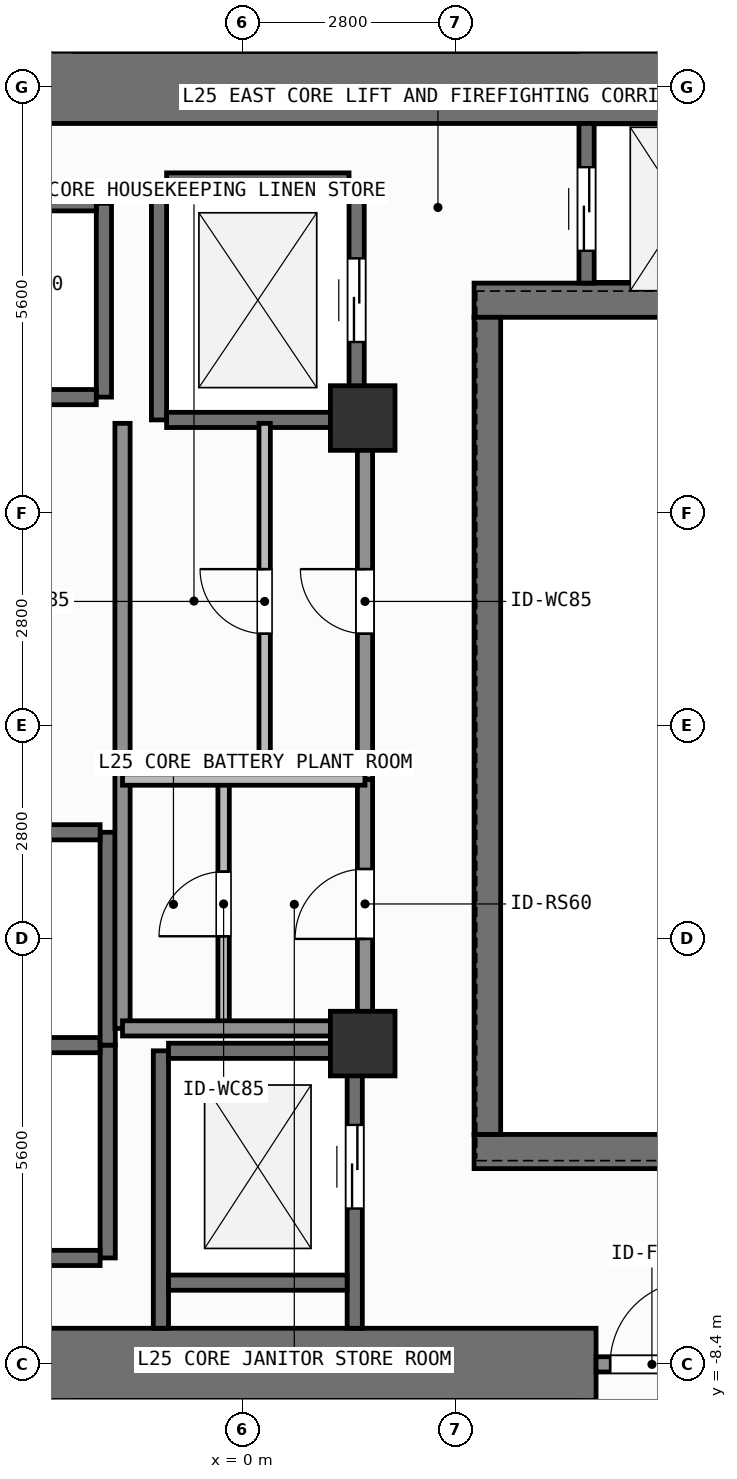
"""IFC4 building model, lengths in metres.
Left out: names, types, materials, properties, quantities, classifications, styles, units other than length and angle.
Written with IfcOpenShell. Run it as: python <this file> out.ifc"""

import sys

from ifc_helpers import new_model, si_unit, direction, frame, frame_2d, origin, origin_2d, place, context, subcontext, project, spatial, rectangle, extrude, element, fill, save


model = new_model("IFC4")
c1 = context("Model", 3, precision=1e-05, world=origin(), true_north=direction((0.0, 1.0)))
c2 = subcontext(c1, "Body", "Model", "MODEL_VIEW")
j1 = project(units=[si_unit("LENGTHUNIT", "METRE"), si_unit("PLANEANGLEUNIT", "RADIAN")], contexts=[c1])
p1 = place(None, origin())
s1 = spatial("IfcSite", under=j1, at=p1, CompositionType="ELEMENT")
p2 = place(p1, origin())
s2 = spatial("IfcBuilding", under=s1, at=p2, CompositionType="ELEMENT")
p3 = place(p2, frame((0.0, 0.0, 100.8)))
s3 = spatial("IfcBuildingStorey", under=s2, at=p3, CompositionType="ELEMENT", Elevation=100.8)
p4 = place(p3, frame((-2.62, -8.4, 0.0), z_axis=(0.0, 0.0, 1.0), x_axis=(1.0, 0.0, 0.0)))
e1 = element("IfcWall", 1, at=p4, inside=s3, PredefinedType="SHEAR", context=c2, shape_type="SweptSolid", body=[
    extrude(rectangle(XDim=7.27, YDim=0.95, at=frame_2d((3.635, 0.0))), origin(), (0.0, 0.0, 1.0), 3.9),
])
p5 = place(p3, frame((-7.55, 8.4, 0.0), z_axis=(0.0, 0.0, 1.0), x_axis=(1.0, 0.0, 0.0)))
e2 = element("IfcWall", 2, at=p5, inside=s3, PredefinedType="SHEAR", context=c2, shape_type="SweptSolid", body=[
    extrude(rectangle(XDim=16.425, YDim=0.95, at=frame_2d((8.212, 0.0))), origin(), (0.0, 0.0, 1.0), 3.9),
])
for number, where, z_axis, x_axis in (
    (3, (3.045, -5.6, 0.0), (0.0, 0.0, 1.0), (1.0, 0.0, 0.0)),
    (4, (3.045, 5.6, 0.0), (0.0, 0.0, 1.0), (1.0, 0.0, 0.0)),
):
    element("IfcWall", number, at=place(p3, frame(where, z_axis=z_axis, x_axis=x_axis)), inside=s3, PredefinedType="SHEAR", context=c2, shape_type="SweptSolid", body=[
        extrude(rectangle(XDim=5.83, YDim=0.45, at=frame_2d((2.915, 0.0))), origin(), (0.0, 0.0, 1.0), 3.9),
    ])
p6 = place(p3, frame((3.22, -5.375, 0.0), z_axis=(0.0, 0.0, 1.0), x_axis=(0.0, 1.0, 0.0)))
e5 = element("IfcWall", 5, at=p6, inside=s3, PredefinedType="SHEAR", context=c2, shape_type="SweptSolid", body=[
    extrude(rectangle(XDim=10.75, YDim=0.35, at=frame_2d((5.375, 0.0))), origin(), (0.0, 0.0, 1.0), 3.9),
])
for number, where, z_axis, x_axis in (
    (6, (1.58, -4.18, 0.0), (0.0, 0.0, 1.0), (1.0, 0.0, 0.0)),
    (7, (1.58, 4.05, 0.0), (0.0, 0.0, 1.0), (1.0, 0.0, 0.0)),
):
    element("IfcColumn", number, at=place(p3, frame(where, z_axis=z_axis, x_axis=x_axis)), inside=s3, PredefinedType="COLUMN", context=c2, shape_type="SweptSolid", body=[
        extrude(rectangle(XDim=0.85, YDim=0.85, at=origin_2d()), origin(), (0.0, 0.0, 1.0), 3.9),
    ])
p7 = place(p3, frame((-1.825, 4.325, 0.0), z_axis=(0.0, 0.0, 1.0), x_axis=(0.0, 1.0, 0.0)))
e8 = element("IfcWall", 8, at=p7, inside=s3, PredefinedType="SHEAR", context=c2, shape_type="SweptSolid", body=[
    extrude(rectangle(XDim=2.55, YDim=0.2, at=frame_2d((1.275, 0.0))), origin(), (0.0, 0.0, 1.0), 3.68),
])
for number, where, z_axis, x_axis in (
    (9, (-4.275, 4.325, 0.0), (0.0, 0.0, 1.0), (1.0, 0.0, 0.0)),
    (10, (-4.275, 6.875, 0.0), (0.0, 0.0, 1.0), (1.0, 0.0, 0.0)),
):
    element("IfcWall", number, at=place(p3, frame(where, z_axis=z_axis, x_axis=x_axis)), inside=s3, PredefinedType="SHEAR", context=c2, shape_type="SweptSolid", body=[
        extrude(rectangle(XDim=2.35, YDim=0.2, at=frame_2d((1.175, 0.0))), origin(), (0.0, 0.0, 1.0), 3.68),
    ])
p8 = place(p3, frame((-1.775, -7.0, 0.0), z_axis=(0.0, 0.0, 1.0), x_axis=(0.0, 1.0, 0.0)))
e11 = element("IfcWall", 11, at=p8, inside=s3, PredefinedType="SHEAR", context=c2, shape_type="SweptSolid", body=[
    extrude(rectangle(XDim=2.8, YDim=0.2, at=frame_2d((1.4, 0.0))), origin(), (0.0, 0.0, 1.0), 3.68),
])
for number, where, z_axis, x_axis in (
    (12, (-4.325, -7.0, 0.0), (0.0, 0.0, 1.0), (1.0, 0.0, 0.0)),
    (13, (-4.325, -4.2, 0.0), (0.0, 0.0, 1.0), (1.0, 0.0, 0.0)),
):
    element("IfcWall", number, at=place(p3, frame(where, z_axis=z_axis, x_axis=x_axis)), inside=s3, PredefinedType="SHEAR", context=c2, shape_type="SweptSolid", body=[
        extrude(rectangle(XDim=2.45, YDim=0.2, at=frame_2d((1.225, 0.0))), origin(), (0.0, 0.0, 1.0), 3.68),
    ])
p9 = place(p3, frame((-1.775, -4.2, 0.0), z_axis=(0.0, 0.0, 1.0), x_axis=(0.0, 1.0, 0.0)))
e14 = element("IfcWall", 14, at=p9, inside=s3, PredefinedType="SHEAR", context=c2, shape_type="SweptSolid", body=[
    extrude(rectangle(XDim=2.8, YDim=0.2, at=frame_2d((1.4, 0.0))), origin(), (0.0, 0.0, 1.0), 3.68),
])
p10 = place(p3, frame((-4.325, -1.4, 0.0), z_axis=(0.0, 0.0, 1.0), x_axis=(1.0, 0.0, 0.0)))
e15 = element("IfcWall", 15, at=p10, inside=s3, PredefinedType="SHEAR", context=c2, shape_type="SweptSolid", body=[
    extrude(rectangle(XDim=2.45, YDim=0.2, at=frame_2d((1.225, 0.0))), origin(), (0.0, 0.0, 1.0), 3.68),
])
p11 = place(p3, frame((-1.1, 4.025, 0.0), z_axis=(0.0, 0.0, 1.0), x_axis=(0.0, 1.0, 0.0)))
e16 = element("IfcWall", 16, at=p11, inside=s3, PredefinedType="SHEAR", context=c2, shape_type="SweptSolid", body=[
    extrude(rectangle(XDim=3.15, YDim=0.2, at=frame_2d((1.575, 0.0))), origin(), (0.0, 0.0, 1.0), 3.68),
])
p12 = place(p3, frame((1.5, 4.025, 0.0), z_axis=(0.0, 0.0, 1.0), x_axis=(0.0, 1.0, 0.0)))
e17 = element("IfcWall", 17, at=p12, inside=s3, PredefinedType="SHEAR", context=c2, shape_type="SweptSolid", body=[
    extrude(rectangle(XDim=3.15, YDim=0.2, at=frame_2d((1.575, 0.0))), origin(), (0.0, 0.0, 1.0), 3.68),
])
p13 = place(p12, frame((1.025, 0.0, 0.0)))
e18 = element("IfcOpeningElement", 18, at=p13, cuts=e17, PredefinedType="OPENING", context=c2, shape_type="SweptSolid", body=[
    extrude(rectangle(XDim=1.1, YDim=2.2, at=frame_2d((0.55, 1.1))), frame((0.0, 0.11, 0.0), z_axis=(0.0, -1.0, 0.0), x_axis=(1.0, 0.0, 0.0)), (0.0, 0.0, 1.0), 0.22),
])
for number, where, z_axis, x_axis in (
    (19, (-1.0, 4.025, 0.0), (0.0, 0.0, 1.0), (1.0, 0.0, 0.0)),
    (20, (-1.0, 7.175, 0.0), (0.0, 0.0, 1.0), (1.0, 0.0, 0.0)),
):
    element("IfcWall", number, at=place(p3, frame(where, z_axis=z_axis, x_axis=x_axis)), inside=s3, PredefinedType="SHEAR", context=c2, shape_type="SweptSolid", body=[
        extrude(rectangle(XDim=2.4, YDim=0.2, at=frame_2d((1.2, 0.0))), origin(), (0.0, 0.0, 1.0), 3.68),
    ])
p14 = place(p3, frame((-1.075, -7.925, 0.0), z_axis=(0.0, 0.0, 1.0), x_axis=(0.0, 1.0, 0.0)))
e21 = element("IfcWall", 21, at=p14, inside=s3, PredefinedType="SHEAR", context=c2, shape_type="SweptSolid", body=[
    extrude(rectangle(XDim=3.65, YDim=0.2, at=frame_2d((1.825, 0.0))), origin(), (0.0, 0.0, 1.0), 3.68),
])
p15 = place(p3, frame((1.475, -7.925, 0.0), z_axis=(0.0, 0.0, 1.0), x_axis=(0.0, 1.0, 0.0)))
e22 = element("IfcWall", 22, at=p15, inside=s3, PredefinedType="SHEAR", context=c2, shape_type="SweptSolid", body=[
    extrude(rectangle(XDim=3.65, YDim=0.2, at=frame_2d((1.825, 0.0))), origin(), (0.0, 0.0, 1.0), 3.68),
])
p16 = place(p15, frame((1.575, 0.0, 0.0)))
e23 = element("IfcOpeningElement", 23, at=p16, cuts=e22, PredefinedType="OPENING", context=c2, shape_type="SweptSolid", body=[
    extrude(rectangle(XDim=1.1, YDim=2.2, at=frame_2d((0.55, 1.1))), frame((0.0, 0.11, 0.0), z_axis=(0.0, -1.0, 0.0), x_axis=(1.0, 0.0, 0.0)), (0.0, 0.0, 1.0), 0.22),
])
for number, where, z_axis, x_axis in (
    (24, (-0.975, -7.325, 0.0), (0.0, 0.0, 1.0), (1.0, 0.0, 0.0)),
    (25, (-0.975, -4.275, 0.0), (0.0, 0.0, 1.0), (1.0, 0.0, 0.0)),
):
    element("IfcWall", number, at=place(p3, frame(where, z_axis=z_axis, x_axis=x_axis)), inside=s3, PredefinedType="SHEAR", context=c2, shape_type="SweptSolid", body=[
        extrude(rectangle(XDim=2.35, YDim=0.2, at=frame_2d((1.175, 0.0))), origin(), (0.0, 0.0, 1.0), 3.68),
    ])
p17 = place(p3, frame((4.525, 5.825, 0.0), z_axis=(0.0, 0.0, 1.0), x_axis=(0.0, 1.0, 0.0)))
e26 = element("IfcWall", 26, at=p17, inside=s3, PredefinedType="SHEAR", context=c2, shape_type="SweptSolid", body=[
    extrude(rectangle(XDim=2.1, YDim=0.2, at=frame_2d((1.05, 0.0))), origin(), (0.0, 0.0, 1.0), 3.68),
])
p18 = place(p17, frame((0.425, 0.0, 0.0)))
e27 = element("IfcOpeningElement", 27, at=p18, cuts=e26, PredefinedType="OPENING", context=c2, shape_type="SweptSolid", body=[
    extrude(rectangle(XDim=1.1, YDim=2.2, at=frame_2d((0.55, 1.1))), frame((0.0, 0.11, 0.0), z_axis=(0.0, -1.0, 0.0), x_axis=(1.0, 0.0, 0.0)), (0.0, 0.0, 1.0), 0.22),
])
p19 = place(p3, frame((4.65, -8.4, 0.0), z_axis=(0.0, 0.0, 1.0), x_axis=(1.0, 0.0, 0.0)))
e28 = element("IfcWall", 28, at=p19, inside=s3, PredefinedType="SOLIDWALL", context=c2, shape_type="SweptSolid", body=[
    extrude(rectangle(XDim=1.47, YDim=0.2, at=frame_2d((0.735, 0.0))), origin(), (0.0, 0.0, 1.0), 2.72),
])
p20 = place(p19, frame((0.185, 0.0, 0.0)))
e29 = element("IfcOpeningElement", 29, at=p20, cuts=e28, PredefinedType="OPENING", context=c2, shape_type="SweptSolid", body=[
    extrude(rectangle(XDim=1.1, YDim=2.15, at=frame_2d((0.55, 1.075))), frame((0.0, 0.11, 0.0), z_axis=(0.0, -1.0, 0.0), x_axis=(1.0, 0.0, 0.0)), (0.0, 0.0, 1.0), 0.22),
])
p21 = place(p3, frame((-0.25, -3.98, 0.0), z_axis=(0.0, 0.0, 1.0), x_axis=(0.0, 1.0, 0.0)))
e30 = element("IfcWall", 30, at=p21, inside=s3, PredefinedType="PARTITIONING", context=c2, shape_type="SweptSolid", body=[
    extrude(rectangle(XDim=3.274, YDim=0.15, at=frame_2d((1.637, 0.0))), origin(), (0.0, 0.0, 1.0), 3.68),
])
p22 = place(p21, frame((1.212, 0.0, 0.0)))
e31 = element("IfcOpeningElement", 31, at=p22, cuts=e30, PredefinedType="OPENING", context=c2, shape_type="SweptSolid", body=[
    extrude(rectangle(XDim=0.85, YDim=2.1, at=frame_2d((0.425, 1.05))), frame((0.0, 0.085, 0.0), z_axis=(0.0, -1.0, 0.0), x_axis=(1.0, 0.0, 0.0)), (0.0, 0.0, 1.0), 0.17),
])
p23 = place(p3, frame((0.29, -0.706, 0.0), z_axis=(0.0, 0.0, 1.0), x_axis=(0.0, 1.0, 0.0)))
e32 = element("IfcWall", 32, at=p23, inside=s3, PredefinedType="PARTITIONING", context=c2, shape_type="SweptSolid", body=[
    extrude(rectangle(XDim=4.686, YDim=0.15, at=frame_2d((2.343, 0.0))), origin(), (0.0, 0.0, 1.0), 3.68),
])
p24 = place(p23, frame((1.918, 0.0, 0.0)))
e33 = element("IfcOpeningElement", 33, at=p24, cuts=e32, PredefinedType="OPENING", context=c2, shape_type="SweptSolid", body=[
    extrude(rectangle(XDim=0.85, YDim=2.1, at=frame_2d((0.425, 1.05))), frame((0.0, 0.085, 0.0), z_axis=(0.0, -1.0, 0.0), x_axis=(1.0, 0.0, 0.0)), (0.0, 0.0, 1.0), 0.17),
])
p25 = place(p3, frame((1.61, -3.98, 0.0), z_axis=(0.0, 0.0, 1.0), x_axis=(0.0, 1.0, 0.0)))
e34 = element("IfcWall", 34, at=p25, inside=s3, PredefinedType="SOLIDWALL", context=c2, shape_type="SweptSolid", body=[
    extrude(rectangle(XDim=3.274, YDim=0.2, at=frame_2d((1.637, 0.0))), origin(), (0.0, 0.0, 1.0), 3.68),
])
p26 = place(p25, frame((1.177, 0.0, 0.0)))
e35 = element("IfcOpeningElement", 35, at=p26, cuts=e34, PredefinedType="OPENING", context=c2, shape_type="SweptSolid", body=[
    extrude(rectangle(XDim=0.92, YDim=2.1, at=frame_2d((0.46, 1.05))), frame((0.0, 0.11, 0.0), z_axis=(0.0, -1.0, 0.0), x_axis=(1.0, 0.0, 0.0)), (0.0, 0.0, 1.0), 0.22),
])
p27 = place(p3, frame((1.61, -0.706, 0.0), z_axis=(0.0, 0.0, 1.0), x_axis=(0.0, 1.0, 0.0)))
e36 = element("IfcWall", 36, at=p27, inside=s3, PredefinedType="SOLIDWALL", context=c2, shape_type="SweptSolid", body=[
    extrude(rectangle(XDim=4.686, YDim=0.2, at=frame_2d((2.343, 0.0))), origin(), (0.0, 0.0, 1.0), 3.68),
])
p28 = place(p27, frame((1.918, 0.0, 0.0)))
e37 = element("IfcOpeningElement", 37, at=p28, cuts=e36, PredefinedType="OPENING", context=c2, shape_type="SweptSolid", body=[
    extrude(rectangle(XDim=0.85, YDim=2.1, at=frame_2d((0.425, 1.05))), frame((0.0, 0.11, 0.0), z_axis=(0.0, -1.0, 0.0), x_axis=(1.0, 0.0, 0.0)), (0.0, 0.0, 1.0), 0.22),
])
p29 = place(p3, frame((-1.58, -3.98, 0.0), z_axis=(0.0, 0.0, 1.0), x_axis=(0.0, 1.0, 0.0)))
e38 = element("IfcWall", 38, at=p29, inside=s3, PredefinedType="SOLIDWALL", context=c2, shape_type="SweptSolid", body=[
    extrude(rectangle(XDim=7.96, YDim=0.2, at=frame_2d((3.98, 0.0))), origin(), (0.0, 0.0, 1.0), 3.68),
])
p30 = place(p3, frame((-1.58, -3.98, 0.0), z_axis=(0.0, 0.0, 1.0), x_axis=(1.0, 0.0, 0.0)))
e39 = element("IfcWall", 39, at=p30, inside=s3, PredefinedType="SOLIDWALL", context=c2, shape_type="SweptSolid", body=[
    extrude(rectangle(XDim=3.19, YDim=0.2, at=frame_2d((1.595, 0.0))), origin(), (0.0, 0.0, 1.0), 3.68),
])
p31 = place(p3, frame((-1.58, -0.706, 0.0), z_axis=(0.0, 0.0, 1.0), x_axis=(1.0, 0.0, 0.0)))
e40 = element("IfcWall", 40, at=p31, inside=s3, PredefinedType="PARTITIONING", context=c2, shape_type="SweptSolid", body=[
    extrude(rectangle(XDim=3.19, YDim=0.15, at=frame_2d((1.595, 0.0))), origin(), (0.0, 0.0, 1.0), 3.68),
])
p32 = place(p13, origin())
e41 = element("IfcDoor", 41, at=p32, inside=s3, OperationType="SLIDING_TO_LEFT", PredefinedType="DOOR", context=c2, shape_type="SweptSolid", body=[
    extrude(rectangle(XDim=1.1, YDim=2.2, at=frame_2d((0.55, 1.1))), frame((0.0, 0.025, 0.0), z_axis=(0.0, -1.0, 0.0), x_axis=(1.0, 0.0, 0.0)), (0.0, 0.0, 1.0), 0.05),
])
fill(e18, e41)
p33 = place(p16, origin())
e42 = element("IfcDoor", 42, at=p33, inside=s3, OperationType="SLIDING_TO_LEFT", PredefinedType="DOOR", context=c2, shape_type="SweptSolid", body=[
    extrude(rectangle(XDim=1.1, YDim=2.2, at=frame_2d((0.55, 1.1))), frame((0.0, 0.025, 0.0), z_axis=(0.0, -1.0, 0.0), x_axis=(1.0, 0.0, 0.0)), (0.0, 0.0, 1.0), 0.05),
])
fill(e23, e42)
p34 = place(p18, origin())
e43 = element("IfcDoor", 43, at=p34, inside=s3, OperationType="SLIDING_TO_LEFT", PredefinedType="DOOR", context=c2, shape_type="SweptSolid", body=[
    extrude(rectangle(XDim=1.1, YDim=2.2, at=frame_2d((0.55, 1.1))), frame((0.0, 0.025, 0.0), z_axis=(0.0, -1.0, 0.0), x_axis=(1.0, 0.0, 0.0)), (0.0, 0.0, 1.0), 0.05),
])
fill(e27, e43)
p35 = place(p20, origin())
e44 = element("IfcDoor", 44, at=p35, inside=s3, OperationType="SINGLE_SWING_RIGHT", PredefinedType="DOOR", context=c2, shape_type="SweptSolid", body=[
    extrude(rectangle(XDim=1.1, YDim=2.15, at=frame_2d((0.55, 1.075))), frame((0.0, 0.025, 0.0), z_axis=(0.0, -1.0, 0.0), x_axis=(1.0, 0.0, 0.0)), (0.0, 0.0, 1.0), 0.05),
])
fill(e29, e44)
p36 = place(p22, origin())
e45 = element("IfcDoor", 45, at=p36, inside=s3, OperationType="SINGLE_SWING_LEFT", PredefinedType="DOOR", context=c2, shape_type="SweptSolid", body=[
    extrude(rectangle(XDim=0.85, YDim=2.1, at=frame_2d((0.425, 1.05))), frame((0.0, 0.025, 0.0), z_axis=(0.0, -1.0, 0.0), x_axis=(1.0, 0.0, 0.0)), (0.0, 0.0, 1.0), 0.05),
])
fill(e31, e45)
p37 = place(p24, origin())
e46 = element("IfcDoor", 46, at=p37, inside=s3, OperationType="SINGLE_SWING_RIGHT", PredefinedType="DOOR", context=c2, shape_type="SweptSolid", body=[
    extrude(rectangle(XDim=0.85, YDim=2.1, at=frame_2d((0.425, 1.05))), frame((0.0, 0.025, 0.0), z_axis=(0.0, -1.0, 0.0), x_axis=(1.0, 0.0, 0.0)), (0.0, 0.0, 1.0), 0.05),
])
fill(e33, e46)
p38 = place(p26, origin())
e47 = element("IfcDoor", 47, at=p38, inside=s3, OperationType="SINGLE_SWING_LEFT", PredefinedType="DOOR", context=c2, shape_type="SweptSolid", body=[
    extrude(rectangle(XDim=0.92, YDim=2.1, at=frame_2d((0.46, 1.05))), frame((0.0, 0.025, 0.0), z_axis=(0.0, -1.0, 0.0), x_axis=(1.0, 0.0, 0.0)), (0.0, 0.0, 1.0), 0.05),
])
fill(e35, e47)
p39 = place(p28, origin())
e48 = element("IfcDoor", 48, at=p39, inside=s3, OperationType="SINGLE_SWING_RIGHT", PredefinedType="DOOR", context=c2, shape_type="SweptSolid", body=[
    extrude(rectangle(XDim=0.85, YDim=2.1, at=frame_2d((0.425, 1.05))), frame((0.0, 0.025, 0.0), z_axis=(0.0, -1.0, 0.0), x_axis=(1.0, 0.0, 0.0)), (0.0, 0.0, 1.0), 0.05),
])
fill(e37, e48)
save(model, sys.argv[1])
